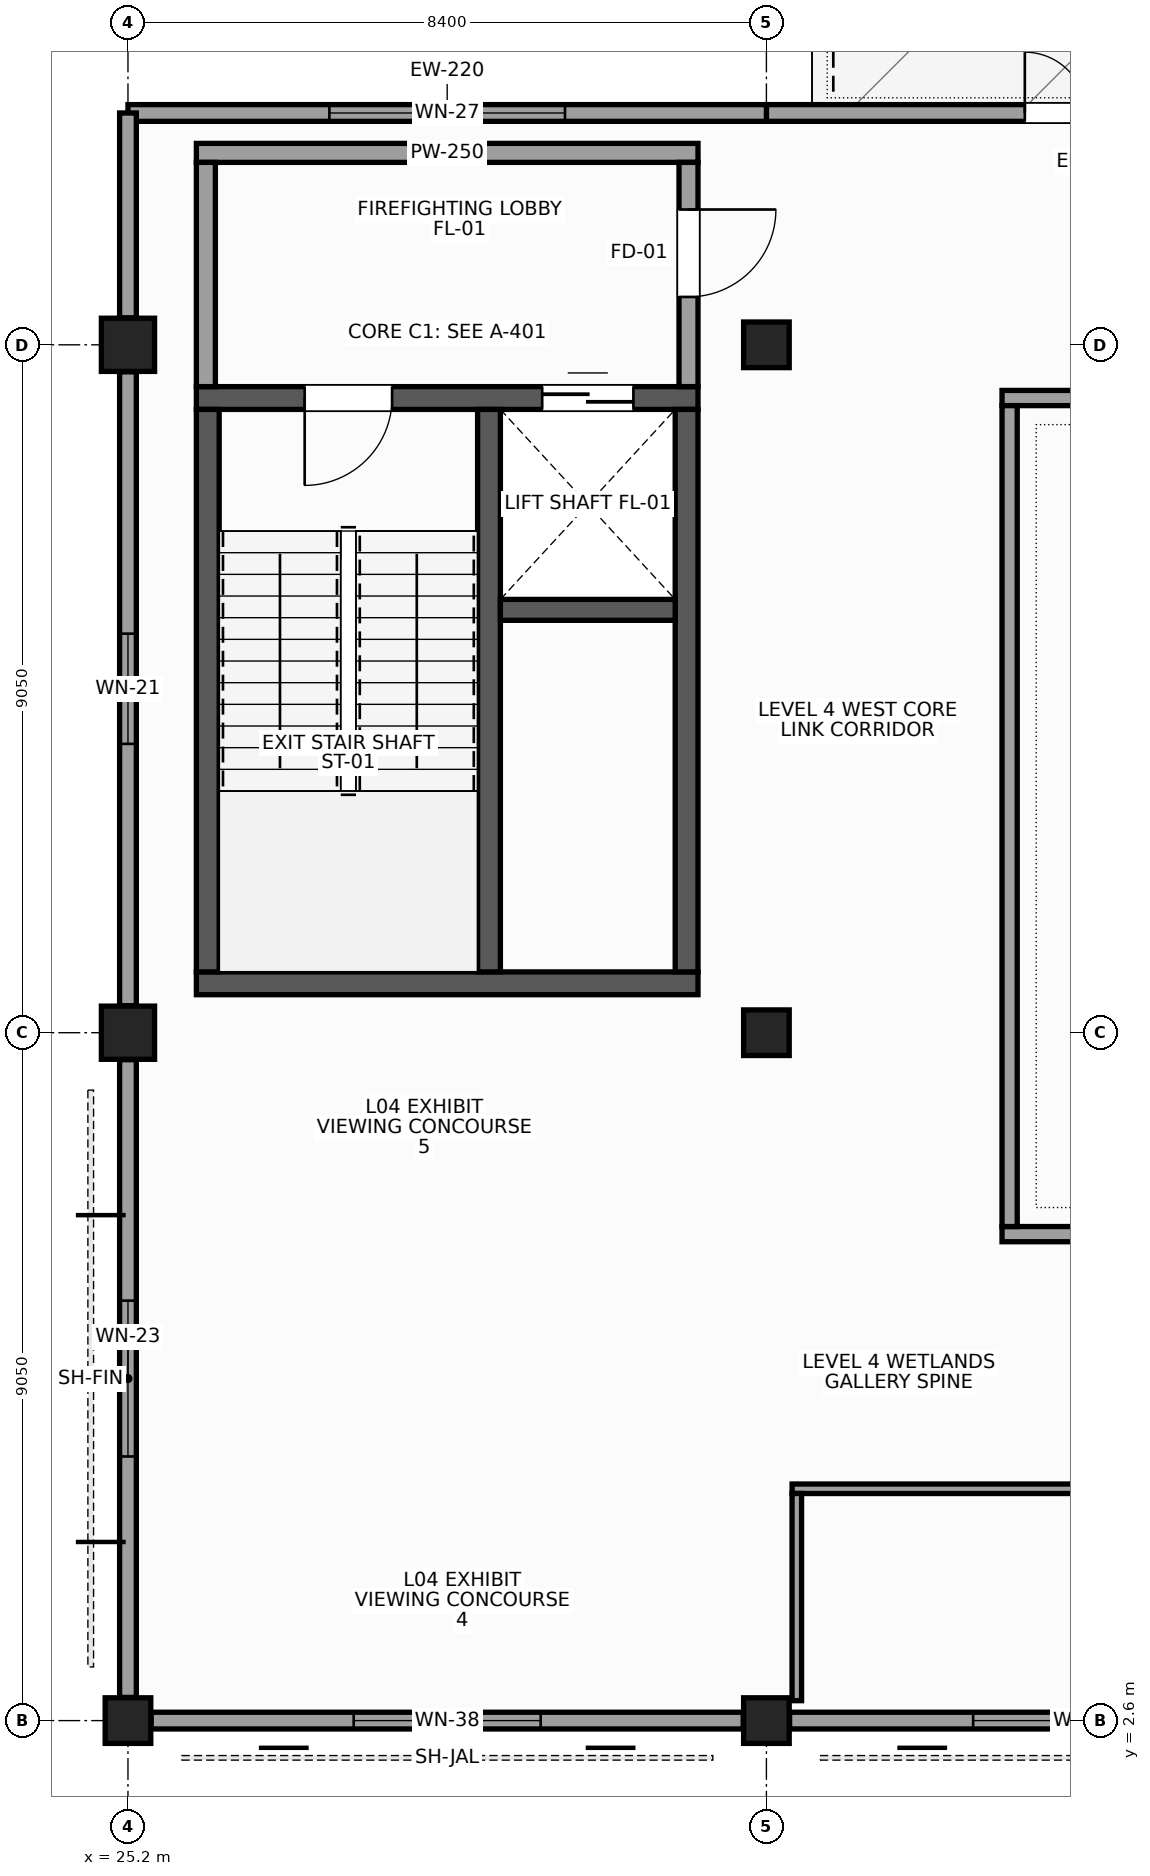
"""IFC4 building model, lengths in metres.
Left out: names, types, materials, properties, quantities, classifications, styles, units other than length and angle.
Written with IfcOpenShell. Run it as: python <this file> out.ifc"""

import sys

from ifc_helpers import new_model, si_unit, direction, frame, frame_2d, origin, origin_2d, place, context, subcontext, project, spatial, rectangle, extrude, element, fill, save


model = new_model("IFC4")
c1 = context("Model", 3, precision=1e-05, world=origin(), true_north=direction((0.0, 1.0)))
c2 = subcontext(c1, "Body", "Model", "MODEL_VIEW")
j1 = project(units=[si_unit("LENGTHUNIT", "METRE"), si_unit("PLANEANGLEUNIT", "RADIAN")], contexts=[c1])
p1 = place(None, origin())
s1 = spatial("IfcSite", under=j1, at=p1, CompositionType="ELEMENT")
p2 = place(p1, origin())
s2 = spatial("IfcBuilding", under=s1, at=p2, CompositionType="ELEMENT")
p3 = place(p2, frame((0.0, 0.0, 20.1)))
s3 = spatial("IfcBuildingStorey", under=s2, at=p3, CompositionType="ELEMENT", Elevation=20.1)
p4 = place(p3, frame((25.2, 2.6, 0.0), z_axis=(0.0, 0.0, 1.0), x_axis=(1.0, 0.0, 0.0)))
e1 = element("IfcColumn", 1, at=p4, inside=s3, PredefinedType="COLUMN", context=c2, shape_type="SweptSolid", body=[
    extrude(rectangle(XDim=0.6, YDim=0.6, at=origin_2d()), origin(), (0.0, 0.0, 1.0), 4.5),
])
p5 = place(p3, frame((25.2, 11.65, 0.0), z_axis=(0.0, 0.0, 1.0), x_axis=(1.0, 0.0, 0.0)))
e2 = element("IfcColumn", 2, at=p5, inside=s3, PredefinedType="COLUMN", context=c2, shape_type="SweptSolid", body=[
    extrude(rectangle(XDim=0.7, YDim=0.7, at=origin_2d()), origin(), (0.0, 0.0, 1.0), 3.75),
])
p6 = place(p3, frame((25.2, 20.7, 0.0), z_axis=(0.0, 0.0, 1.0), x_axis=(1.0, 0.0, 0.0)))
e3 = element("IfcColumn", 3, at=p6, inside=s3, PredefinedType="COLUMN", context=c2, shape_type="SweptSolid", body=[
    extrude(rectangle(XDim=0.7, YDim=0.7, at=origin_2d()), origin(), (0.0, 0.0, 1.0), 4.2),
])
for number, where, z_axis, x_axis in (
    (4, (33.6, 2.6, 0.0), (0.0, 0.0, 1.0), (1.0, 0.0, 0.0)),
    (5, (33.6, 11.65, 0.0), (0.0, 0.0, 1.0), (1.0, 0.0, 0.0)),
    (6, (33.6, 20.7, 0.0), (0.0, 0.0, 1.0), (1.0, 0.0, 0.0)),
):
    element("IfcColumn", number, at=place(p3, frame(where, z_axis=z_axis, x_axis=x_axis)), inside=s3, PredefinedType="COLUMN", context=c2, shape_type="SweptSolid", body=[
        extrude(rectangle(XDim=0.6, YDim=0.6, at=origin_2d()), origin(), (0.0, 0.0, 1.0), 4.5),
    ])
p7 = place(p3, frame((25.505, 2.6, 0.0), z_axis=(0.0, 0.0, 1.0), x_axis=(1.0, 0.0, 0.0)))
e7 = element("IfcWall", 7, at=p7, inside=s3, PredefinedType="STANDARD", context=c2, shape_type="SweptSolid", body=[
    extrude(rectangle(XDim=7.79, YDim=0.22, at=frame_2d((3.895, 0.0))), origin(), (0.0, 0.0, 1.0), 3.631),
])
p8 = place(p7, frame((2.665, 0.0, 0.95)))
e8 = element("IfcOpeningElement", 8, at=p8, cuts=e7, PredefinedType="OPENING", context=c2, shape_type="SweptSolid", body=[
    extrude(rectangle(XDim=2.46, YDim=2.14, at=frame_2d((1.23, 1.07))), frame((0.0, 0.12, 0.0), z_axis=(0.0, -1.0, 0.0), x_axis=(1.0, 0.0, 0.0)), (0.0, 0.0, 1.0), 0.24),
])
p9 = place(p3, frame((33.905, 2.6, 0.0), z_axis=(0.0, 0.0, 1.0), x_axis=(1.0, 0.0, 0.0)))
e9 = element("IfcWall", 9, at=p9, inside=s3, PredefinedType="STANDARD", context=c2, shape_type="SweptSolid", body=[
    extrude(rectangle(XDim=7.79, YDim=0.22, at=frame_2d((3.895, 0.0))), origin(), (0.0, 0.0, 1.0), 4.2),
])
p10 = place(p9, frame((2.415, 0.0, 0.95)))
e10 = element("IfcOpeningElement", 10, at=p10, cuts=e9, PredefinedType="OPENING", context=c2, shape_type="SweptSolid", body=[
    extrude(rectangle(XDim=2.96, YDim=2.16, at=frame_2d((1.48, 1.08))), frame((0.0, 0.12, 0.0), z_axis=(0.0, -1.0, 0.0), x_axis=(1.0, 0.0, 0.0)), (0.0, 0.0, 1.0), 0.24),
])
p11 = place(p3, frame((42.0, 23.75, 0.0), z_axis=(0.0, 0.0, 1.0), x_axis=(-1.0, 0.0, 0.0)))
e11 = element("IfcWall", 11, at=p11, inside=s3, PredefinedType="STANDARD", context=c2, shape_type="SweptSolid", body=[
    extrude(rectangle(XDim=8.4, YDim=0.22, at=frame_2d((4.2, 0.0))), origin(), (0.0, 0.0, 1.0), 3.428),
])
p12 = place(p11, frame((3.4, 0.0, 0.0)))
e12 = element("IfcOpeningElement", 12, at=p12, cuts=e11, PredefinedType="OPENING", context=c2, shape_type="SweptSolid", body=[
    extrude(rectangle(XDim=1.6, YDim=2.25, at=frame_2d((0.8, 1.125))), frame((0.0, 0.12, 0.0), z_axis=(0.0, -1.0, 0.0), x_axis=(1.0, 0.0, 0.0)), (0.0, 0.0, 1.0), 0.24),
])
p13 = place(p3, frame((33.6, 23.75, 0.0), z_axis=(0.0, 0.0, 1.0), x_axis=(-1.0, 0.0, 0.0)))
e13 = element("IfcWall", 13, at=p13, inside=s3, PredefinedType="STANDARD", context=c2, shape_type="SweptSolid", body=[
    extrude(rectangle(XDim=8.4, YDim=0.22, at=frame_2d((4.2, 0.0))), origin(), (0.0, 0.0, 1.0), 3.428),
])
p14 = place(p13, frame((2.65, 0.0, 0.95)))
e14 = element("IfcOpeningElement", 14, at=p14, cuts=e13, PredefinedType="OPENING", context=c2, shape_type="SweptSolid", body=[
    extrude(rectangle(XDim=3.1, YDim=2.05, at=frame_2d((1.55, 1.025))), frame((0.0, 0.12, 0.0), z_axis=(0.0, -1.0, 0.0), x_axis=(1.0, 0.0, 0.0)), (0.0, 0.0, 1.0), 0.24),
])
p15 = place(p3, frame((25.2, 23.75, 0.0), z_axis=(0.0, 0.0, 1.0), x_axis=(0.0, -1.0, 0.0)))
e15 = element("IfcWall", 15, at=p15, inside=s3, PredefinedType="STANDARD", context=c2, shape_type="SweptSolid", body=[
    extrude(rectangle(XDim=2.695, YDim=0.22, at=frame_2d((1.348, 0.0))), origin(), (0.0, 0.0, 1.0), 3.504),
])
p16 = place(p3, frame((25.2, 20.345, 0.0), z_axis=(0.0, 0.0, 1.0), x_axis=(0.0, -1.0, 0.0)))
e16 = element("IfcWall", 16, at=p16, inside=s3, PredefinedType="STANDARD", context=c2, shape_type="SweptSolid", body=[
    extrude(rectangle(XDim=8.34, YDim=0.22, at=frame_2d((4.17, 0.0))), origin(), (0.0, 0.0, 1.0), 3.504),
])
p17 = place(p16, frame((3.445, 0.0, 0.95)))
e17 = element("IfcOpeningElement", 17, at=p17, cuts=e16, PredefinedType="OPENING", context=c2, shape_type="SweptSolid", body=[
    extrude(rectangle(XDim=1.45, YDim=2.05, at=frame_2d((0.725, 1.025))), frame((0.0, 0.12, 0.0), z_axis=(0.0, -1.0, 0.0), x_axis=(1.0, 0.0, 0.0)), (0.0, 0.0, 1.0), 0.24),
])
p18 = place(p3, frame((25.2, 11.295, 0.0), z_axis=(0.0, 0.0, 1.0), x_axis=(0.0, -1.0, 0.0)))
e18 = element("IfcWall", 18, at=p18, inside=s3, PredefinedType="STANDARD", context=c2, shape_type="SweptSolid", body=[
    extrude(rectangle(XDim=8.39, YDim=0.22, at=frame_2d((4.195, 0.0))), origin(), (0.0, 0.0, 1.0), 3.631),
])
p19 = place(p18, frame((3.17, 0.0, 0.95)))
e19 = element("IfcOpeningElement", 19, at=p19, cuts=e18, PredefinedType="OPENING", context=c2, shape_type="SweptSolid", body=[
    extrude(rectangle(XDim=2.05, YDim=1.85, at=frame_2d((1.025, 0.925))), frame((0.0, 0.12, 0.0), z_axis=(0.0, -1.0, 0.0), x_axis=(1.0, 0.0, 0.0)), (0.0, 0.0, 1.0), 0.24),
])
p20 = place(p3, frame((26.1, 12.3, 0.0), z_axis=(0.0, 0.0, 1.0), x_axis=(1.0, 0.0, 0.0)))
e20 = element("IfcWall", 20, at=p20, inside=s3, PredefinedType="SHEAR", context=c2, shape_type="SweptSolid", body=[
    extrude(rectangle(XDim=6.6, YDim=0.3, at=frame_2d((3.3, 0.0))), origin(), (0.0, 0.0, 1.0), 4.2),
])
p21 = place(p3, frame((26.1, 20.0, 0.0), z_axis=(0.0, 0.0, 1.0), x_axis=(1.0, 0.0, 0.0)))
e21 = element("IfcWall", 21, at=p21, inside=s3, PredefinedType="SHEAR", context=c2, shape_type="SweptSolid", body=[
    extrude(rectangle(XDim=6.6, YDim=0.3, at=frame_2d((3.3, 0.0))), origin(), (0.0, 0.0, 1.0), 4.2),
])
p22 = place(p21, frame((1.425, 0.0, 0.0)))
e22 = element("IfcOpeningElement", 22, at=p22, cuts=e21, PredefinedType="OPENING", context=c2, shape_type="SweptSolid", body=[
    extrude(rectangle(XDim=1.15, YDim=2.2, at=frame_2d((0.575, 1.1))), frame((0.0, 0.16, 0.0), z_axis=(0.0, -1.0, 0.0), x_axis=(1.0, 0.0, 0.0)), (0.0, 0.0, 1.0), 0.32),
])
p23 = place(p21, frame((4.55, 0.0, 0.0)))
e23 = element("IfcOpeningElement", 23, at=p23, cuts=e21, PredefinedType="OPENING", context=c2, shape_type="SweptSolid", body=[
    extrude(rectangle(XDim=1.2, YDim=2.15, at=frame_2d((0.6, 1.075))), frame((0.0, 0.16, 0.0), z_axis=(0.0, -1.0, 0.0), x_axis=(1.0, 0.0, 0.0)), (0.0, 0.0, 1.0), 0.32),
])
for number, where, z_axis, x_axis in (
    (24, (26.25, 12.45, 0.0), (0.0, 0.0, 1.0), (0.0, 1.0, 0.0)),
    (25, (32.55, 12.45, 0.0), (0.0, 0.0, 1.0), (0.0, 1.0, 0.0)),
    (26, (29.95, 12.45, 0.0), (0.0, 0.0, 1.0), (0.0, 1.0, 0.0)),
):
    element("IfcWall", number, at=place(p3, frame(where, z_axis=z_axis, x_axis=x_axis)), inside=s3, PredefinedType="SHEAR", context=c2, shape_type="SweptSolid", body=[
        extrude(rectangle(XDim=7.4, YDim=0.3, at=frame_2d((3.7, 0.0))), origin(), (0.0, 0.0, 1.0), 4.2),
    ])
p24 = place(p3, frame((30.1, 17.213, 0.0), z_axis=(0.0, 0.0, 1.0), x_axis=(1.0, 0.0, 0.0)))
e27 = element("IfcWall", 27, at=p24, inside=s3, PredefinedType="SHEAR", context=c2, shape_type="SweptSolid", body=[
    extrude(rectangle(XDim=2.3, YDim=0.275, at=frame_2d((1.15, 0.0))), origin(), (0.0, 0.0, 1.0), 4.2),
])
p25 = place(p3, frame((26.1, 23.225, 0.0), z_axis=(0.0, 0.0, 1.0), x_axis=(1.0, 0.0, 0.0)))
e28 = element("IfcWall", 28, at=p25, inside=s3, PredefinedType="PARTITIONING", context=c2, shape_type="SweptSolid", body=[
    extrude(rectangle(XDim=6.6, YDim=0.25, at=frame_2d((3.3, 0.0))), origin(), (0.0, 0.0, 1.0), 4.2),
])
p26 = place(p3, frame((26.225, 20.15, 0.0), z_axis=(0.0, 0.0, 1.0), x_axis=(0.0, 1.0, 0.0)))
e29 = element("IfcWall", 29, at=p26, inside=s3, PredefinedType="PARTITIONING", context=c2, shape_type="SweptSolid", body=[
    extrude(rectangle(XDim=2.95, YDim=0.25, at=frame_2d((1.475, 0.0))), origin(), (0.0, 0.0, 1.0), 4.2),
])
p27 = place(p3, frame((32.575, 20.15, 0.0), z_axis=(0.0, 0.0, 1.0), x_axis=(0.0, 1.0, 0.0)))
e30 = element("IfcWall", 30, at=p27, inside=s3, PredefinedType="PARTITIONING", context=c2, shape_type="SweptSolid", body=[
    extrude(rectangle(XDim=2.95, YDim=0.25, at=frame_2d((1.475, 0.0))), origin(), (0.0, 0.0, 1.0), 3.783),
])
p28 = place(p27, frame((1.18, 0.0, 0.0)))
e31 = element("IfcOpeningElement", 31, at=p28, cuts=e30, PredefinedType="OPENING", context=c2, shape_type="SweptSolid", body=[
    extrude(rectangle(XDim=1.15, YDim=2.2, at=frame_2d((0.575, 1.1))), frame((0.0, 0.135, 0.0), z_axis=(0.0, -1.0, 0.0), x_axis=(1.0, 0.0, 0.0)), (0.0, 0.0, 1.0), 0.27),
])
p29 = place(p3, frame((33.938, 5.65, 0.0), z_axis=(0.0, 0.0, 1.0), x_axis=(1.0, 0.0, 0.0)))
e32 = element("IfcWall", 32, at=p29, inside=s3, PredefinedType="PARTITIONING", context=c2, shape_type="SweptSolid", body=[
    extrude(rectangle(XDim=24.325, YDim=0.125, at=frame_2d((12.163, 0.0))), origin(), (0.0, 0.0, 1.0), 4.2),
])
p30 = place(p29, frame((11.303, 0.0, 0.0)))
e33 = element("IfcOpeningElement", 33, at=p30, cuts=e32, PredefinedType="OPENING", context=c2, shape_type="SweptSolid", body=[
    extrude(rectangle(XDim=1.72, YDim=2.35, at=frame_2d((0.86, 1.175))), frame((0.0, 0.073, 0.0), z_axis=(0.0, -1.0, 0.0), x_axis=(1.0, 0.0, 0.0)), (0.0, 0.0, 1.0), 0.145),
])
p31 = place(p29, frame((13.623, 0.0, 1.05)))
e34 = element("IfcOpeningElement", 34, at=p31, cuts=e32, PredefinedType="OPENING", context=c2, shape_type="SweptSolid", body=[
    extrude(rectangle(XDim=1.65, YDim=1.5, at=frame_2d((0.825, 0.75))), frame((0.0, 0.073, 0.0), z_axis=(0.0, -1.0, 0.0), x_axis=(1.0, 0.0, 0.0)), (0.0, 0.0, 1.0), 0.145),
])
p32 = place(p3, frame((34.0, 2.862, 0.0), z_axis=(0.0, 0.0, 1.0), x_axis=(0.0, 1.0, 0.0)))
e35 = element("IfcWall", 35, at=p32, inside=s3, PredefinedType="PARTITIONING", context=c2, shape_type="SweptSolid", body=[
    extrude(rectangle(XDim=2.726, YDim=0.125, at=frame_2d((1.363, 0.0))), origin(), (0.0, 0.0, 1.0), 4.2),
])
p33 = place(p3, frame((36.7, 9.0, 0.0), z_axis=(0.0, 0.0, 1.0), x_axis=(1.0, 0.0, 0.0)))
e36 = element("IfcWall", 36, at=p33, inside=s3, PredefinedType="PARTITIONING", context=c2, shape_type="SweptSolid", body=[
    extrude(rectangle(XDim=21.6, YDim=0.2, at=frame_2d((10.8, 0.0))), origin(), (0.0, 0.0, 1.0), 4.2),
])
p34 = place(p33, frame((9.88, 0.0, 0.0)))
e37 = element("IfcOpeningElement", 37, at=p34, cuts=e36, PredefinedType="OPENING", context=c2, shape_type="SweptSolid", body=[
    extrude(rectangle(XDim=1.84, YDim=2.35, at=frame_2d((0.92, 1.175))), frame((0.0, 0.11, 0.0), z_axis=(0.0, -1.0, 0.0), x_axis=(1.0, 0.0, 0.0)), (0.0, 0.0, 1.0), 0.22),
])
p35 = place(p33, frame((12.32, 0.0, 1.05)))
e38 = element("IfcOpeningElement", 38, at=p35, cuts=e36, PredefinedType="OPENING", context=c2, shape_type="SweptSolid", body=[
    extrude(rectangle(XDim=1.95, YDim=1.55, at=frame_2d((0.975, 0.775))), frame((0.0, 0.11, 0.0), z_axis=(0.0, -1.0, 0.0), x_axis=(1.0, 0.0, 0.0)), (0.0, 0.0, 1.0), 0.22),
])
p36 = place(p3, frame((36.7, 20.0, 0.0), z_axis=(0.0, 0.0, 1.0), x_axis=(1.0, 0.0, 0.0)))
e39 = element("IfcWall", 39, at=p36, inside=s3, PredefinedType="PARTITIONING", context=c2, shape_type="SweptSolid", body=[
    extrude(rectangle(XDim=21.6, YDim=0.2, at=frame_2d((10.8, 0.0))), origin(), (0.0, 0.0, 1.0), 3.428),
])
p37 = place(p3, frame((36.8, 9.1, 0.0), z_axis=(0.0, 0.0, 1.0), x_axis=(0.0, 1.0, 0.0)))
e40 = element("IfcWall", 40, at=p37, inside=s3, PredefinedType="PARTITIONING", context=c2, shape_type="SweptSolid", body=[
    extrude(rectangle(XDim=10.8, YDim=0.2, at=frame_2d((5.4, 0.0))), origin(), (0.0, 0.0, 1.0), 3.75),
])
p38 = place(p8, origin())
e41 = element("IfcWindow", 41, at=p38, inside=s3, PartitioningType="SINGLE_PANEL", PredefinedType="WINDOW", context=c2, shape_type="SweptSolid", body=[
    extrude(rectangle(XDim=2.46, YDim=2.14, at=frame_2d((1.23, 1.07))), frame((0.0, 0.03, 0.0), z_axis=(0.0, -1.0, 0.0), x_axis=(1.0, 0.0, 0.0)), (0.0, 0.0, 1.0), 0.06),
])
fill(e8, e41)
p39 = place(p10, origin())
e42 = element("IfcWindow", 42, at=p39, inside=s3, PartitioningType="SINGLE_PANEL", PredefinedType="WINDOW", context=c2, shape_type="SweptSolid", body=[
    extrude(rectangle(XDim=2.96, YDim=2.16, at=frame_2d((1.48, 1.08))), frame((0.0, 0.03, 0.0), z_axis=(0.0, -1.0, 0.0), x_axis=(1.0, 0.0, 0.0)), (0.0, 0.0, 1.0), 0.06),
])
fill(e10, e42)
p40 = place(p12, frame((1.6, 0.0, 0.0), z_axis=(0.0, 0.0, 1.0), x_axis=(-1.0, 0.0, 0.0)))
e43 = element("IfcDoor", 43, at=p40, inside=s3, OperationType="DOUBLE_DOOR_SINGLE_SWING", PredefinedType="DOOR", context=c2, shape_type="SweptSolid", body=[
    extrude(rectangle(XDim=1.6, YDim=2.25, at=frame_2d((0.8, 1.125))), frame((0.0, 0.025, 0.0), z_axis=(0.0, -1.0, 0.0), x_axis=(1.0, 0.0, 0.0)), (0.0, 0.0, 1.0), 0.05),
])
fill(e12, e43)
p41 = place(p14, origin())
e44 = element("IfcWindow", 44, at=p41, inside=s3, PartitioningType="SINGLE_PANEL", PredefinedType="WINDOW", context=c2, shape_type="SweptSolid", body=[
    extrude(rectangle(XDim=3.1, YDim=2.05, at=frame_2d((1.55, 1.025))), frame((0.0, 0.03, 0.0), z_axis=(0.0, -1.0, 0.0), x_axis=(1.0, 0.0, 0.0)), (0.0, 0.0, 1.0), 0.06),
])
fill(e14, e44)
p42 = place(p17, origin())
e45 = element("IfcWindow", 45, at=p42, inside=s3, PartitioningType="SINGLE_PANEL", PredefinedType="WINDOW", context=c2, shape_type="SweptSolid", body=[
    extrude(rectangle(XDim=1.45, YDim=2.05, at=frame_2d((0.725, 1.025))), frame((0.0, 0.03, 0.0), z_axis=(0.0, -1.0, 0.0), x_axis=(1.0, 0.0, 0.0)), (0.0, 0.0, 1.0), 0.06),
])
fill(e17, e45)
p43 = place(p19, origin())
e46 = element("IfcWindow", 46, at=p43, inside=s3, PartitioningType="SINGLE_PANEL", PredefinedType="WINDOW", context=c2, shape_type="SweptSolid", body=[
    extrude(rectangle(XDim=2.05, YDim=1.85, at=frame_2d((1.025, 0.925))), frame((0.0, 0.03, 0.0), z_axis=(0.0, -1.0, 0.0), x_axis=(1.0, 0.0, 0.0)), (0.0, 0.0, 1.0), 0.06),
])
fill(e19, e46)
p44 = place(p22, frame((1.15, 0.0, 0.0), z_axis=(0.0, 0.0, 1.0), x_axis=(-1.0, 0.0, 0.0)))
e47 = element("IfcDoor", 47, at=p44, inside=s3, OperationType="SINGLE_SWING_RIGHT", PredefinedType="DOOR", context=c2, shape_type="SweptSolid", body=[
    extrude(rectangle(XDim=1.15, YDim=2.2, at=frame_2d((0.575, 1.1))), frame((0.0, 0.025, 0.0), z_axis=(0.0, -1.0, 0.0), x_axis=(1.0, 0.0, 0.0)), (0.0, 0.0, 1.0), 0.05),
])
fill(e22, e47)
p45 = place(p23, origin())
e48 = element("IfcDoor", 48, at=p45, inside=s3, OperationType="DOUBLE_DOOR_SLIDING", PredefinedType="DOOR", context=c2, shape_type="SweptSolid", body=[
    extrude(rectangle(XDim=1.2, YDim=2.15, at=frame_2d((0.6, 1.075))), frame((0.0, 0.025, 0.0), z_axis=(0.0, -1.0, 0.0), x_axis=(1.0, 0.0, 0.0)), (0.0, 0.0, 1.0), 0.05),
])
fill(e23, e48)
p46 = place(p28, frame((1.15, 0.0, 0.0), z_axis=(0.0, 0.0, 1.0), x_axis=(-1.0, 0.0, 0.0)))
e49 = element("IfcDoor", 49, at=p46, inside=s3, OperationType="SINGLE_SWING_LEFT", PredefinedType="DOOR", context=c2, shape_type="SweptSolid", body=[
    extrude(rectangle(XDim=1.15, YDim=2.2, at=frame_2d((0.575, 1.1))), frame((0.0, 0.025, 0.0), z_axis=(0.0, -1.0, 0.0), x_axis=(1.0, 0.0, 0.0)), (0.0, 0.0, 1.0), 0.05),
])
fill(e31, e49)
save(model, sys.argv[1])
